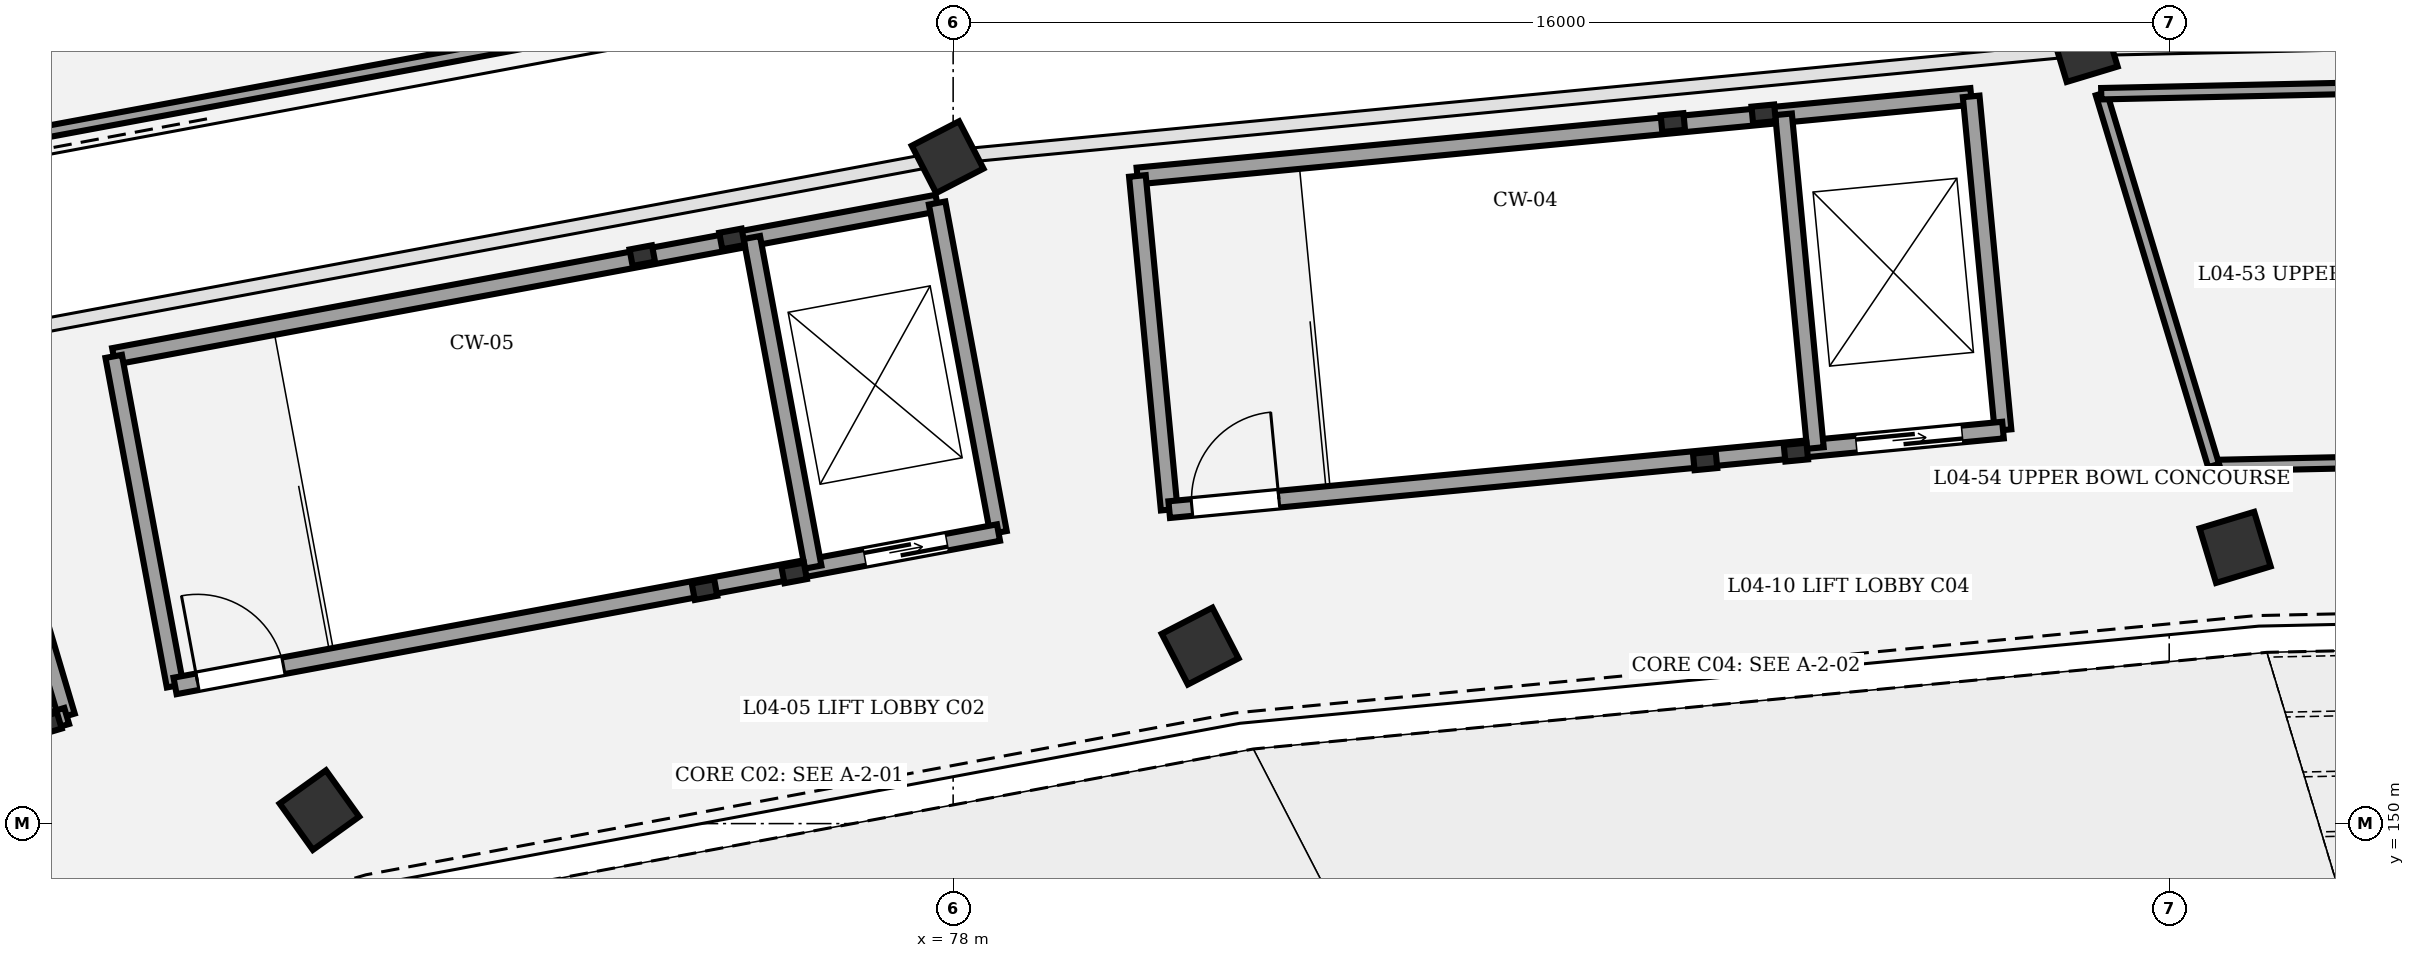
"""IFC4 building model, lengths in metres.
Left out: names, types, materials, properties, quantities, classifications, styles, units other than length and angle.
Written with IfcOpenShell. Run it as: python <this file> out.ifc"""

import sys

from ifc_helpers import new_model, si_unit, direction, frame, frame_2d, origin, origin_2d, place, context, subcontext, project, spatial, rectangle, extrude, element, fill, save


model = new_model("IFC4")
c1 = context("Model", 3, precision=1e-05, world=origin(), true_north=direction((0.0, 1.0)))
c2 = subcontext(c1, "Body", "Model", "MODEL_VIEW")
j1 = project(units=[si_unit("LENGTHUNIT", "METRE"), si_unit("PLANEANGLEUNIT", "RADIAN")], contexts=[c1])
p1 = place(None, origin())
s1 = spatial("IfcSite", under=j1, at=p1, CompositionType="ELEMENT")
p2 = place(p1, origin())
s2 = spatial("IfcBuilding", under=s1, at=p2, CompositionType="ELEMENT")
p3 = place(p2, frame((0.0, 0.0, 19.2)))
s3 = spatial("IfcBuildingStorey", under=s2, at=p3, CompositionType="ELEMENT", Elevation=19.2)
p4 = place(p3, frame((94.867, 153.634, 0.0), z_axis=(0.0, 0.0, 1.0), x_axis=(-0.289198876314, 0.957269037387, 0.0)))
e1 = element("IfcColumn", 1, at=p4, inside=s3, PredefinedType="COLUMN", context=c2, shape_type="SweptSolid", body=[
    extrude(rectangle(XDim=0.75, YDim=0.75, at=origin_2d()), origin(), (0.0, 0.0, 1.0), 4.8),
])
p5 = place(p3, frame((92.885, 160.194, 0.0), z_axis=(0.0, 0.0, 1.0), x_axis=(-0.289198876314, 0.957269037387, 0.0)))
e2 = element("IfcColumn", 2, at=p5, inside=s3, PredefinedType="COLUMN", context=c2, shape_type="SweptSolid", body=[
    extrude(rectangle(XDim=0.7, YDim=0.7, at=origin_2d()), origin(), (0.0, 0.0, 1.0), 4.8),
])
p6 = place(p3, frame((81.25, 152.335, 0.0), z_axis=(0.0, 0.0, 1.0), x_axis=(-0.458959712465, 0.888457079624, 0.0)))
e3 = element("IfcColumn", 3, at=p6, inside=s3, PredefinedType="COLUMN", context=c2, shape_type="SweptSolid", body=[
    extrude(rectangle(XDim=0.75, YDim=0.75, at=origin_2d()), origin(), (0.0, 0.0, 1.0), 4.8),
])
p7 = place(p3, frame((77.927, 158.767, 0.0), z_axis=(0.0, 0.0, 1.0), x_axis=(-0.458959712465, 0.888457079624, 0.0)))
e4 = element("IfcColumn", 4, at=p7, inside=s3, PredefinedType="COLUMN", context=c2, shape_type="SweptSolid", body=[
    extrude(rectangle(XDim=0.7, YDim=0.7, at=origin_2d()), origin(), (0.0, 0.0, 1.0), 4.8),
])
p8 = place(p3, frame((69.662, 150.177, 0.0), z_axis=(0.0, 0.0, 1.0), x_axis=(-0.582974127943, 0.812490717577, 0.0)))
e5 = element("IfcColumn", 5, at=p8, inside=s3, PredefinedType="COLUMN", context=c2, shape_type="SweptSolid", body=[
    extrude(rectangle(XDim=0.75, YDim=0.75, at=origin_2d()), origin(), (0.0, 0.0, 1.0), 4.8),
])
for number, where, z_axis, x_axis in (
    (6, (74.729, 153.078, 0.0), (0.0, 0.0, 1.0), (0.983, 0.183, 0.0)),
    (7, (75.908, 153.298, 0.0), (0.0, 0.0, 1.0), (0.983, 0.183, 0.0)),
    (8, (75.09, 157.692, 0.0), (0.0, 0.0, 1.0), (0.983, 0.183, 0.0)),
    (9, (73.91, 157.473, 0.0), (0.0, 0.0, 1.0), (0.983, 0.183, 0.0)),
):
    element("IfcColumn", number, at=place(p3, frame(where, z_axis=z_axis, x_axis=x_axis)), inside=s3, PredefinedType="COLUMN", context=c2, shape_type="SweptSolid", body=[
        extrude(rectangle(XDim=0.3, YDim=0.22, at=origin_2d()), origin(), (0.0, 0.0, 1.0), 4.8),
    ])
p9 = place(p3, frame((66.955, 156.147, 0.0), z_axis=(0.0, 0.0, 1.0), x_axis=(0.983093434234, 0.183104613723, 0.0)))
e10 = element("IfcWall", 10, at=p9, inside=s3, PredefinedType="SHEAR", context=c2, shape_type="SweptSolid", body=[
    extrude(rectangle(XDim=11.02, YDim=0.22, at=frame_2d((5.51, 0.0))), origin(), (0.0, 0.0, 1.0), 4.55),
])
for number, where, z_axis, x_axis in (
    (11, (67.763, 151.811, 0.0), (0.0, 0.0, 1.0), (-0.183, 0.983, 0.0)),
    (12, (78.596, 153.829, 0.0), (0.0, 0.0, 1.0), (-0.183, 0.983, 0.0)),
):
    element("IfcWall", number, at=place(p3, frame(where, z_axis=z_axis, x_axis=x_axis)), inside=s3, PredefinedType="SHEAR", context=c2, shape_type="SweptSolid", body=[
        extrude(rectangle(XDim=4.41, YDim=0.22, at=frame_2d((2.205, 0.0))), origin(), (0.0, 0.0, 1.0), 4.55),
    ])
p10 = place(p3, frame((67.763, 151.811, 0.0), z_axis=(0.0, 0.0, 1.0), x_axis=(0.983093434234, 0.183104613723, 0.0)))
e13 = element("IfcWall", 13, at=p10, inside=s3, PredefinedType="SHEAR", context=c2, shape_type="SweptSolid", body=[
    extrude(rectangle(XDim=11.02, YDim=0.22, at=frame_2d((5.51, 0.0))), origin(), (0.0, 0.0, 1.0), 4.55),
])
p11 = place(p10, frame((0.3, 0.0, 0.0)))
e14 = element("IfcOpeningElement", 14, at=p11, cuts=e13, PredefinedType="OPENING", context=c2, shape_type="SweptSolid", body=[
    extrude(rectangle(XDim=1.15, YDim=2.15, at=frame_2d((0.575, 1.075))), frame((0.0, 0.12, 0.0), z_axis=(0.0, -1.0, 0.0), x_axis=(1.0, 0.0, 0.0)), (0.0, 0.0, 1.0), 0.24),
])
p12 = place(p10, frame((9.23, 0.0, 0.0)))
e15 = element("IfcOpeningElement", 15, at=p12, cuts=e13, PredefinedType="OPENING", context=c2, shape_type="SweptSolid", body=[
    extrude(rectangle(XDim=1.1, YDim=2.15, at=frame_2d((0.55, 1.075))), frame((0.0, 0.12, 0.0), z_axis=(0.0, -1.0, 0.0), x_axis=(1.0, 0.0, 0.0)), (0.0, 0.0, 1.0), 0.24),
])
p13 = place(p3, frame((76.158, 153.375, 0.0), z_axis=(0.0, 0.0, 1.0), x_axis=(-0.183078394814, 0.983098317236, 0.0)))
e16 = element("IfcWall", 16, at=p13, inside=s3, PredefinedType="SHEAR", context=c2, shape_type="SweptSolid", body=[
    extrude(rectangle(XDim=4.41, YDim=0.22, at=frame_2d((2.205, 0.0))), origin(), (0.0, 0.0, 1.0), 4.55),
])
for number, where, z_axis, x_axis in (
    (17, (87.894, 154.773, 0.0), (0.0, 0.0, 1.0), (0.995, 0.095, 0.0)),
    (18, (89.088, 154.887, 0.0), (0.0, 0.0, 1.0), (0.995, 0.095, 0.0)),
    (19, (88.664, 159.337, 0.0), (0.0, 0.0, 1.0), (0.995, 0.095, 0.0)),
    (20, (87.469, 159.223, 0.0), (0.0, 0.0, 1.0), (0.995, 0.095, 0.0)),
):
    element("IfcColumn", number, at=place(p3, frame(where, z_axis=z_axis, x_axis=x_axis)), inside=s3, PredefinedType="COLUMN", context=c2, shape_type="SweptSolid", body=[
        extrude(rectangle(XDim=0.3, YDim=0.22, at=origin_2d()), origin(), (0.0, 0.0, 1.0), 4.8),
    ])
p14 = place(p3, frame((80.424, 158.521, 0.0), z_axis=(0.0, 0.0, 1.0), x_axis=(0.99547962713, 0.094975322952, 0.0)))
e21 = element("IfcWall", 21, at=p14, inside=s3, PredefinedType="SHEAR", context=c2, shape_type="SweptSolid", body=[
    extrude(rectangle(XDim=11.02, YDim=0.22, at=frame_2d((5.51, 0.0))), origin(), (0.0, 0.0, 1.0), 4.55),
])
for number, where, z_axis, x_axis in (
    (22, (80.843, 154.13, 0.0), (0.0, 0.0, 1.0), (-0.095, 0.995, 0.0)),
    (23, (91.813, 155.177, 0.0), (0.0, 0.0, 1.0), (-0.095, 0.995, 0.0)),
):
    element("IfcWall", number, at=place(p3, frame(where, z_axis=z_axis, x_axis=x_axis)), inside=s3, PredefinedType="SHEAR", context=c2, shape_type="SweptSolid", body=[
        extrude(rectangle(XDim=4.41, YDim=0.22, at=frame_2d((2.205, 0.0))), origin(), (0.0, 0.0, 1.0), 4.55),
    ])
p15 = place(p3, frame((80.843, 154.13, 0.0), z_axis=(0.0, 0.0, 1.0), x_axis=(0.995479427285, 0.094977417594, 0.0)))
e24 = element("IfcWall", 24, at=p15, inside=s3, PredefinedType="SHEAR", context=c2, shape_type="SweptSolid", body=[
    extrude(rectangle(XDim=11.02, YDim=0.22, at=frame_2d((5.51, 0.0))), origin(), (0.0, 0.0, 1.0), 4.55),
])
p16 = place(p15, frame((0.3, 0.0, 0.0)))
e25 = element("IfcOpeningElement", 25, at=p16, cuts=e24, PredefinedType="OPENING", context=c2, shape_type="SweptSolid", body=[
    extrude(rectangle(XDim=1.15, YDim=2.15, at=frame_2d((0.575, 1.075))), frame((0.0, 0.12, 0.0), z_axis=(0.0, -1.0, 0.0), x_axis=(1.0, 0.0, 0.0)), (0.0, 0.0, 1.0), 0.24),
])
p17 = place(p15, frame((9.08, 0.0, 0.0)))
e26 = element("IfcOpeningElement", 26, at=p17, cuts=e24, PredefinedType="OPENING", context=c2, shape_type="SweptSolid", body=[
    extrude(rectangle(XDim=1.4, YDim=2.25, at=frame_2d((0.7, 1.125))), frame((0.0, 0.12, 0.0), z_axis=(0.0, -1.0, 0.0), x_axis=(1.0, 0.0, 0.0)), (0.0, 0.0, 1.0), 0.24),
])
p18 = place(p3, frame((89.344, 154.941, 0.0), z_axis=(0.0, 0.0, 1.0), x_axis=(-0.094942328893, 0.995482774429, 0.0)))
e27 = element("IfcWall", 27, at=p18, inside=s3, PredefinedType="SHEAR", context=c2, shape_type="SweptSolid", body=[
    extrude(rectangle(XDim=4.41, YDim=0.22, at=frame_2d((2.205, 0.0))), origin(), (0.0, 0.0, 1.0), 4.55),
])
p19 = place(p3, frame((66.096, 151.313, 0.0), z_axis=(0.0, 0.0, 1.0), x_axis=(0.958670893355, 0.284517342588, 0.0)))
e28 = element("IfcColumn", 28, at=p19, inside=s3, PredefinedType="COLUMN", context=c2, shape_type="SweptSolid", body=[
    extrude(rectangle(XDim=0.3, YDim=0.22, at=origin_2d()), origin(), (0.0, 0.0, 1.0), 4.8),
])
p20 = place(p3, frame((66.337, 151.416, 0.0), z_axis=(0.0, 0.0, 1.0), x_axis=(-0.284497328872, 0.958676832861, 0.0)))
e29 = element("IfcWall", 29, at=p20, inside=s3, PredefinedType="SHEAR", context=c2, shape_type="SweptSolid", body=[
    extrude(rectangle(XDim=4.41, YDim=0.22, at=frame_2d((2.205, 0.0))), origin(), (0.0, 0.0, 1.0), 4.55),
])
p21 = place(p3, frame((58.15, 148.986, 0.0), z_axis=(0.0, 0.0, 1.0), x_axis=(0.958665631999, 0.284535069937, 0.0)))
e30 = element("IfcWall", 30, at=p21, inside=s3, PredefinedType="SHEAR", context=c2, shape_type="SweptSolid", body=[
    extrude(rectangle(XDim=8.54, YDim=0.22, at=frame_2d((4.27, 0.0))), origin(), (0.0, 0.0, 1.0), 4.55),
])
p22 = place(p21, frame((0.3, 0.0, 0.0)))
e31 = element("IfcOpeningElement", 31, at=p22, cuts=e30, PredefinedType="OPENING", context=c2, shape_type="SweptSolid", body=[
    extrude(rectangle(XDim=1.15, YDim=2.15, at=frame_2d((0.575, 1.075))), frame((0.0, 0.12, 0.0), z_axis=(0.0, -1.0, 0.0), x_axis=(1.0, 0.0, 0.0)), (0.0, 0.0, 1.0), 0.24),
])
p23 = place(p3, frame((114.96, 155.149, 0.0), z_axis=(0.0, 0.0, 1.0), x_axis=(-0.999768282717, -0.021526283298, 0.0)))
e32 = element("IfcWall", 32, at=p23, inside=s3, PredefinedType="PARTITIONING", context=c2, shape_type="SweptSolid", body=[
    extrude(rectangle(XDim=20.381, YDim=0.15, at=frame_2d((10.19, 0.0))), origin(), (0.0, 0.0, 1.0), 3.55),
])
p24 = place(p23, frame((9.531, 0.0, 0.0)))
e33 = element("IfcOpeningElement", 33, at=p24, cuts=e32, PredefinedType="OPENING", context=c2, shape_type="SweptSolid", body=[
    extrude(rectangle(XDim=1.32, YDim=2.1, at=frame_2d((0.66, 1.05))), frame((0.0, 0.085, 0.0), z_axis=(0.0, -1.0, 0.0), x_axis=(1.0, 0.0, 0.0)), (0.0, 0.0, 1.0), 0.17),
])
p25 = place(p3, frame((94.584, 154.71, 0.0), z_axis=(0.0, 0.0, 1.0), x_axis=(-0.289258185314, 0.957251117643, 0.0)))
e34 = element("IfcWall", 34, at=p25, inside=s3, PredefinedType="PARTITIONING", context=c2, shape_type="SweptSolid", body=[
    extrude(rectangle(XDim=5.111, YDim=0.15, at=frame_2d((2.555, 0.0))), origin(), (0.0, 0.0, 1.0), 3.55),
])
p26 = place(p3, frame((93.106, 159.603, 0.0), z_axis=(0.0, 0.0, 1.0), x_axis=(0.99976837209, 0.021522132079, 0.0)))
e35 = element("IfcWall", 35, at=p26, inside=s3, PredefinedType="PARTITIONING", context=c2, shape_type="SweptSolid", body=[
    extrude(rectangle(XDim=21.859, YDim=0.15, at=frame_2d((10.93, 0.0))), origin(), (0.0, 0.0, 1.0), 3.55),
])
p27 = place(p3, frame((77.469, 161.225, 0.0), z_axis=(0.0, 0.0, 1.0), x_axis=(-0.983094545276, -0.183098648406, 0.0)))
e36 = element("IfcWall", 36, at=p27, inside=s3, PredefinedType="PARTITIONING", context=c2, shape_type="SweptSolid", body=[
    extrude(rectangle(XDim=12.947, YDim=0.15, at=frame_2d((6.474, 0.0))), origin(), (0.0, 0.0, 1.0), 3.55),
])
p28 = place(p11, origin())
e37 = element("IfcDoor", 37, at=p28, inside=s3, OperationType="SINGLE_SWING_LEFT", PredefinedType="DOOR", context=c2, shape_type="SweptSolid", body=[
    extrude(rectangle(XDim=1.15, YDim=2.15, at=frame_2d((0.575, 1.075))), frame((0.0, 0.025, 0.0), z_axis=(0.0, -1.0, 0.0), x_axis=(1.0, 0.0, 0.0)), (0.0, 0.0, 1.0), 0.05),
])
fill(e14, e37)
p29 = place(p12, origin())
e38 = element("IfcDoor", 38, at=p29, inside=s3, OperationType="DOUBLE_DOOR_SLIDING", PredefinedType="DOOR", context=c2, shape_type="SweptSolid", body=[
    extrude(rectangle(XDim=1.1, YDim=2.15, at=frame_2d((0.55, 1.075))), frame((0.0, 0.025, 0.0), z_axis=(0.0, -1.0, 0.0), x_axis=(1.0, 0.0, 0.0)), (0.0, 0.0, 1.0), 0.05),
])
fill(e15, e38)
p30 = place(p16, origin())
e39 = element("IfcDoor", 39, at=p30, inside=s3, OperationType="SINGLE_SWING_RIGHT", PredefinedType="DOOR", context=c2, shape_type="SweptSolid", body=[
    extrude(rectangle(XDim=1.15, YDim=2.15, at=frame_2d((0.575, 1.075))), frame((0.0, 0.025, 0.0), z_axis=(0.0, -1.0, 0.0), x_axis=(1.0, 0.0, 0.0)), (0.0, 0.0, 1.0), 0.05),
])
fill(e25, e39)
p31 = place(p17, origin())
e40 = element("IfcDoor", 40, at=p31, inside=s3, OperationType="DOUBLE_DOOR_SLIDING", PredefinedType="DOOR", context=c2, shape_type="SweptSolid", body=[
    extrude(rectangle(XDim=1.4, YDim=2.25, at=frame_2d((0.7, 1.125))), frame((0.0, 0.025, 0.0), z_axis=(0.0, -1.0, 0.0), x_axis=(1.0, 0.0, 0.0)), (0.0, 0.0, 1.0), 0.05),
])
fill(e26, e40)
save(model, sys.argv[1])
